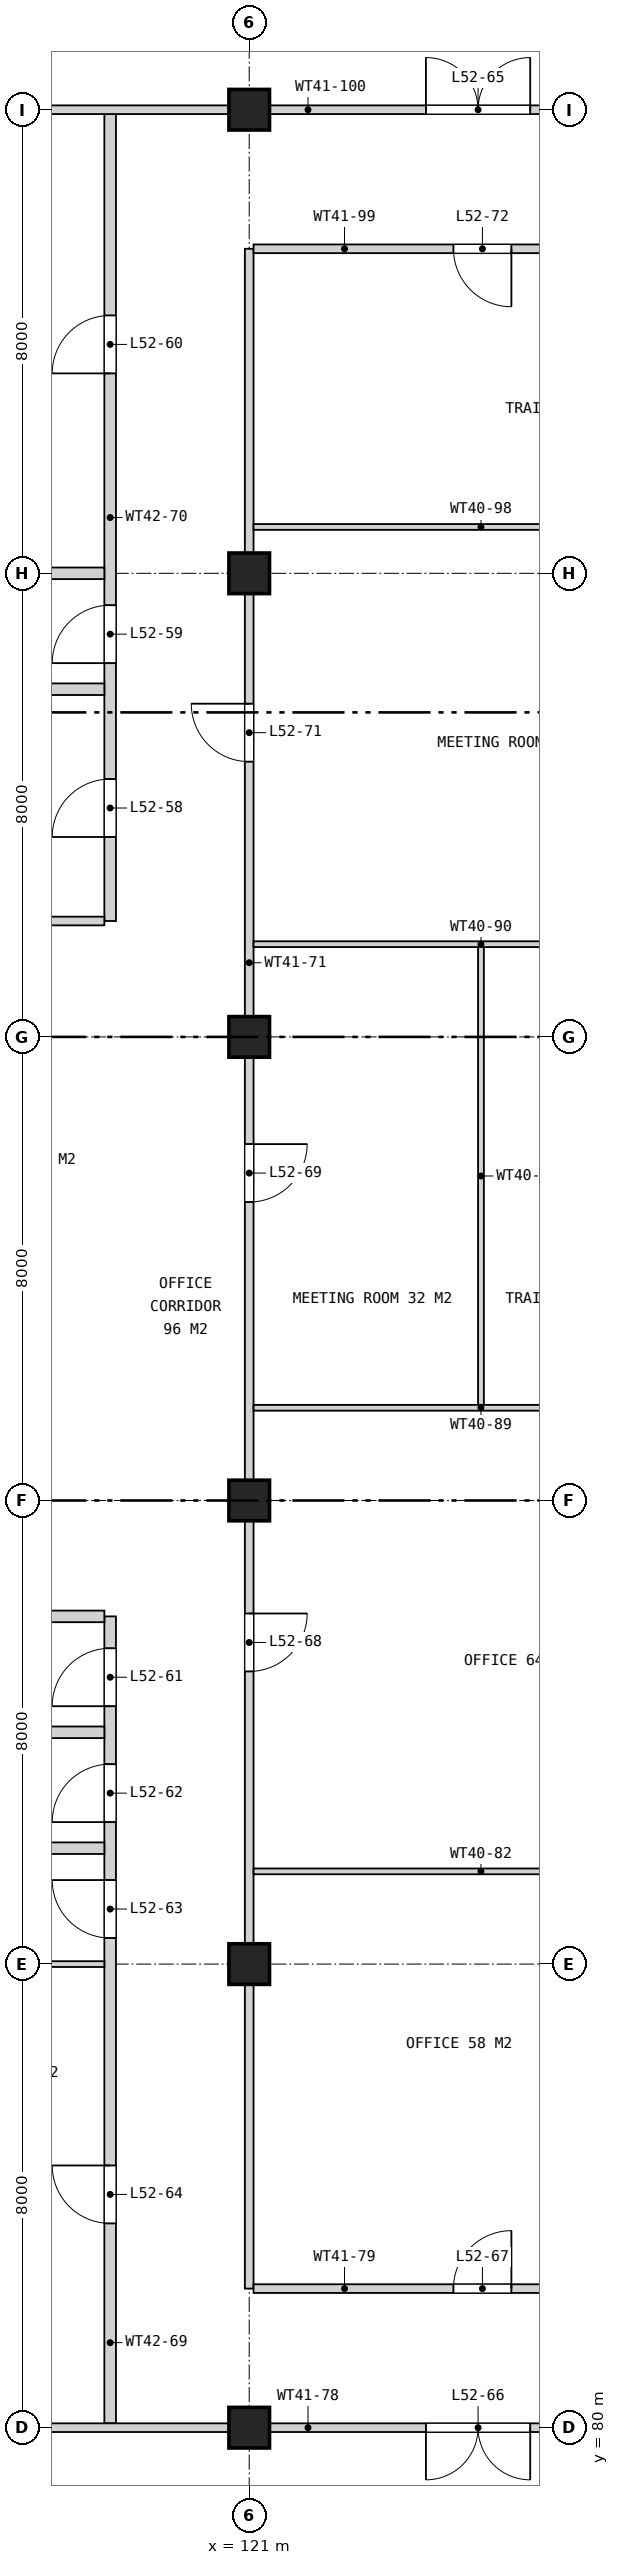
"""IFC4 building model, lengths in metres.
Left out: names, types, materials, properties, quantities, classifications, styles, units other than length and angle.
Written with IfcOpenShell. Run it as: python <this file> out.ifc"""

import sys

from ifc_helpers import new_model, si_unit, direction, frame, frame_2d, origin, origin_2d, place, context, subcontext, project, spatial, rectangle, extrude, element, fill, save


model = new_model("IFC4")
c1 = context("Model", 3, precision=1e-05, world=origin(), true_north=direction((0.0, 1.0)))
c2 = subcontext(c1, "Body", "Model", "MODEL_VIEW")
j1 = project(units=[si_unit("LENGTHUNIT", "METRE"), si_unit("PLANEANGLEUNIT", "RADIAN")], contexts=[c1])
p1 = place(None, origin())
s1 = spatial("IfcSite", under=j1, at=p1, CompositionType="ELEMENT")
p2 = place(p1, origin())
s2 = spatial("IfcBuilding", under=s1, at=p2, CompositionType="ELEMENT")
p3 = place(p2, frame((0.0, 0.0, 245.1)))
s3 = spatial("IfcBuildingStorey", under=s2, at=p3, CompositionType="ELEMENT", Elevation=245.1)
for number, where, z_axis, x_axis in (
    (1, (121.0, 80.0, 0.0), (0.0, 0.0, 1.0), (1.0, 0.0, 0.0)),
    (2, (121.0, 88.0, 0.0), (0.0, 0.0, 1.0), (1.0, 0.0, 0.0)),
    (3, (121.0, 96.0, 0.0), (0.0, 0.0, 1.0), (1.0, 0.0, 0.0)),
    (4, (121.0, 104.0, 0.0), (0.0, 0.0, 1.0), (1.0, 0.0, 0.0)),
    (5, (121.0, 112.0, 0.0), (0.0, 0.0, 1.0), (1.0, 0.0, 0.0)),
    (6, (121.0, 120.0, 0.0), (0.0, 0.0, 1.0), (1.0, 0.0, 0.0)),
):
    element("IfcColumn", number, at=place(p3, frame(where, z_axis=z_axis, x_axis=x_axis)), inside=s3, PredefinedType="COLUMN", context=c2, shape_type="SweptSolid", body=[
        extrude(rectangle(XDim=0.7, YDim=0.7, at=origin_2d()), origin(), (0.0, 0.0, 1.0), 4.2),
    ])
p4 = place(p3, frame((118.6, 80.075, 0.0), z_axis=(0.0, 0.0, 1.0), x_axis=(0.0, 1.0, 0.0)))
e7 = element("IfcWall", 7, at=p4, inside=s3, PredefinedType="SOLIDWALL", context=c2, shape_type="SweptSolid", body=[
    extrude(rectangle(XDim=13.925, YDim=0.2, at=frame_2d((6.962, 0.0))), origin(), (0.0, 0.0, 1.0), 3.443),
])
p5 = place(p4, frame((12.375, 0.0, 0.0)))
e8 = element("IfcOpeningElement", 8, at=p5, cuts=e7, PredefinedType="OPENING", context=c2, shape_type="SweptSolid", body=[
    extrude(rectangle(XDim=1.0, YDim=2.1, at=frame_2d((0.5, 1.05))), frame((0.0, 0.11, 0.0), z_axis=(0.0, -1.0, 0.0), x_axis=(1.0, 0.0, 0.0)), (0.0, 0.0, 1.0), 0.22),
])
p6 = place(p4, frame((10.375, 0.0, 0.0)))
e9 = element("IfcOpeningElement", 9, at=p6, cuts=e7, PredefinedType="OPENING", context=c2, shape_type="SweptSolid", body=[
    extrude(rectangle(XDim=1.0, YDim=2.1, at=frame_2d((0.5, 1.05))), frame((0.0, 0.11, 0.0), z_axis=(0.0, -1.0, 0.0), x_axis=(1.0, 0.0, 0.0)), (0.0, 0.0, 1.0), 0.22),
])
p7 = place(p4, frame((8.375, 0.0, 0.0)))
e10 = element("IfcOpeningElement", 10, at=p7, cuts=e7, PredefinedType="OPENING", context=c2, shape_type="SweptSolid", body=[
    extrude(rectangle(XDim=1.0, YDim=2.1, at=frame_2d((0.5, 1.05))), frame((0.0, 0.11, 0.0), z_axis=(0.0, -1.0, 0.0), x_axis=(1.0, 0.0, 0.0)), (0.0, 0.0, 1.0), 0.22),
])
p8 = place(p4, frame((3.45, 0.0, 0.0)))
e11 = element("IfcOpeningElement", 11, at=p8, cuts=e7, PredefinedType="OPENING", context=c2, shape_type="SweptSolid", body=[
    extrude(rectangle(XDim=1.0, YDim=2.1, at=frame_2d((0.5, 1.05))), frame((0.0, 0.11, 0.0), z_axis=(0.0, -1.0, 0.0), x_axis=(1.0, 0.0, 0.0)), (0.0, 0.0, 1.0), 0.22),
])
p9 = place(p3, frame((118.6, 106.0, 0.0), z_axis=(0.0, 0.0, 1.0), x_axis=(0.0, 1.0, 0.0)))
e12 = element("IfcWall", 12, at=p9, inside=s3, PredefinedType="SOLIDWALL", context=c2, shape_type="SweptSolid", body=[
    extrude(rectangle(XDim=13.925, YDim=0.2, at=frame_2d((6.962, 0.0))), origin(), (0.0, 0.0, 1.0), 3.443),
])
p10 = place(p9, frame((1.45, 0.0, 0.0)))
e13 = element("IfcOpeningElement", 13, at=p10, cuts=e12, PredefinedType="OPENING", context=c2, shape_type="SweptSolid", body=[
    extrude(rectangle(XDim=1.0, YDim=2.1, at=frame_2d((0.5, 1.05))), frame((0.0, 0.11, 0.0), z_axis=(0.0, -1.0, 0.0), x_axis=(1.0, 0.0, 0.0)), (0.0, 0.0, 1.0), 0.22),
])
p11 = place(p9, frame((4.45, 0.0, 0.0)))
e14 = element("IfcOpeningElement", 14, at=p11, cuts=e12, PredefinedType="OPENING", context=c2, shape_type="SweptSolid", body=[
    extrude(rectangle(XDim=1.0, YDim=2.1, at=frame_2d((0.5, 1.05))), frame((0.0, 0.11, 0.0), z_axis=(0.0, -1.0, 0.0), x_axis=(1.0, 0.0, 0.0)), (0.0, 0.0, 1.0), 0.22),
])
p12 = place(p9, frame((9.45, 0.0, 0.0)))
e15 = element("IfcOpeningElement", 15, at=p12, cuts=e12, PredefinedType="OPENING", context=c2, shape_type="SweptSolid", body=[
    extrude(rectangle(XDim=1.0, YDim=2.1, at=frame_2d((0.5, 1.05))), frame((0.0, 0.11, 0.0), z_axis=(0.0, -1.0, 0.0), x_axis=(1.0, 0.0, 0.0)), (0.0, 0.0, 1.0), 0.22),
])
p13 = place(p3, frame((121.0, 82.4, 0.0), z_axis=(0.0, 0.0, 1.0), x_axis=(0.0, 1.0, 0.0)))
e16 = element("IfcWall", 16, at=p13, inside=s3, PredefinedType="PARTITIONING", context=c2, shape_type="SweptSolid", body=[
    extrude(rectangle(XDim=35.2, YDim=0.15, at=frame_2d((17.6, 0.0))), origin(), (0.0, 0.0, 1.0), 3.443),
])
p14 = place(p13, frame((10.65, 0.0, 0.0)))
e17 = element("IfcOpeningElement", 17, at=p14, cuts=e16, PredefinedType="OPENING", context=c2, shape_type="SweptSolid", body=[
    extrude(rectangle(XDim=1.0, YDim=2.1, at=frame_2d((0.5, 1.05))), frame((0.0, 0.085, 0.0), z_axis=(0.0, -1.0, 0.0), x_axis=(1.0, 0.0, 0.0)), (0.0, 0.0, 1.0), 0.17),
])
p15 = place(p13, frame((18.75, 0.0, 0.0)))
e18 = element("IfcOpeningElement", 18, at=p15, cuts=e16, PredefinedType="OPENING", context=c2, shape_type="SweptSolid", body=[
    extrude(rectangle(XDim=1.0, YDim=2.1, at=frame_2d((0.5, 1.05))), frame((0.0, 0.085, 0.0), z_axis=(0.0, -1.0, 0.0), x_axis=(1.0, 0.0, 0.0)), (0.0, 0.0, 1.0), 0.17),
])
p16 = place(p13, frame((26.35, 0.0, 0.0)))
e19 = element("IfcOpeningElement", 19, at=p16, cuts=e16, PredefinedType="OPENING", context=c2, shape_type="SweptSolid", body=[
    extrude(rectangle(XDim=1.0, YDim=2.1, at=frame_2d((0.5, 1.05))), frame((0.0, 0.085, 0.0), z_axis=(0.0, -1.0, 0.0), x_axis=(1.0, 0.0, 0.0)), (0.0, 0.0, 1.0), 0.17),
])
p17 = place(p3, frame((125.0, 97.65, 0.0), z_axis=(0.0, 0.0, 1.0), x_axis=(0.0, 1.0, 0.0)))
e20 = element("IfcWall", 20, at=p17, inside=s3, PredefinedType="PARTITIONING", context=c2, shape_type="SweptSolid", body=[
    extrude(rectangle(XDim=7.9, YDim=0.1, at=frame_2d((3.95, 0.0))), origin(), (0.0, 0.0, 1.0), 3.443),
])
p18 = place(p3, frame((112.73, 80.0, 0.0), z_axis=(0.0, 0.0, 1.0), x_axis=(1.0, 0.0, 0.0)))
e21 = element("IfcWall", 21, at=p18, inside=s3, PredefinedType="PARTITIONING", context=c2, shape_type="SweptSolid", body=[
    extrude(rectangle(XDim=18.57, YDim=0.15, at=frame_2d((9.285, 0.0))), origin(), (0.0, 0.0, 1.0), 3.443),
])
p19 = place(p18, frame((11.32, 0.0, 0.0)))
e22 = element("IfcOpeningElement", 22, at=p19, cuts=e21, PredefinedType="OPENING", context=c2, shape_type="SweptSolid", body=[
    extrude(rectangle(XDim=1.8, YDim=2.1, at=frame_2d((0.9, 1.05))), frame((0.0, 0.085, 0.0), z_axis=(0.0, -1.0, 0.0), x_axis=(1.0, 0.0, 0.0)), (0.0, 0.0, 1.0), 0.17),
])
p20 = place(p3, frame((121.075, 82.4, 0.0), z_axis=(0.0, 0.0, 1.0), x_axis=(1.0, 0.0, 0.0)))
e23 = element("IfcWall", 23, at=p20, inside=s3, PredefinedType="PARTITIONING", context=c2, shape_type="SweptSolid", body=[
    extrude(rectangle(XDim=7.85, YDim=0.15, at=frame_2d((3.925, 0.0))), origin(), (0.0, 0.0, 1.0), 3.443),
])
p21 = place(p20, frame((3.45, 0.0, 0.0)))
e24 = element("IfcOpeningElement", 24, at=p21, cuts=e23, PredefinedType="OPENING", context=c2, shape_type="SweptSolid", body=[
    extrude(rectangle(XDim=1.0, YDim=2.1, at=frame_2d((0.5, 1.05))), frame((0.0, 0.085, 0.0), z_axis=(0.0, -1.0, 0.0), x_axis=(1.0, 0.0, 0.0)), (0.0, 0.0, 1.0), 0.17),
])
p22 = place(p3, frame((113.0, 88.0, 0.0), z_axis=(0.0, 0.0, 1.0), x_axis=(1.0, 0.0, 0.0)))
e25 = element("IfcWall", 25, at=p22, inside=s3, PredefinedType="PARTITIONING", context=c2, shape_type="SweptSolid", body=[
    extrude(rectangle(XDim=5.5, YDim=0.1, at=frame_2d((2.75, 0.0))), origin(), (0.0, 0.0, 1.0), 3.443),
])
p23 = place(p3, frame((121.075, 89.6, 0.0), z_axis=(0.0, 0.0, 1.0), x_axis=(1.0, 0.0, 0.0)))
e26 = element("IfcWall", 26, at=p23, inside=s3, PredefinedType="PARTITIONING", context=c2, shape_type="SweptSolid", body=[
    extrude(rectangle(XDim=7.85, YDim=0.1, at=frame_2d((3.925, 0.0))), origin(), (0.0, 0.0, 1.0), 3.443),
])
for number, where, z_axis, x_axis in (
    (27, (113.0, 90.0, 0.0), (0.0, 0.0, 1.0), (1.0, 0.0, 0.0)),
    (28, (113.0, 92.0, 0.0), (0.0, 0.0, 1.0), (1.0, 0.0, 0.0)),
    (29, (113.0, 94.0, 0.0), (0.0, 0.0, 1.0), (1.0, 0.0, 0.0)),
):
    element("IfcWall", number, at=place(p3, frame(where, z_axis=z_axis, x_axis=x_axis)), inside=s3, PredefinedType="SOLIDWALL", context=c2, shape_type="SweptSolid", body=[
        extrude(rectangle(XDim=5.5, YDim=0.2, at=frame_2d((2.75, 0.0))), origin(), (0.0, 0.0, 1.0), 3.443),
    ])
for number, where, z_axis, x_axis in (
    (30, (121.075, 97.6, 0.0), (0.0, 0.0, 1.0), (1.0, 0.0, 0.0)),
    (31, (121.075, 105.6, 0.0), (0.0, 0.0, 1.0), (1.0, 0.0, 0.0)),
):
    element("IfcWall", number, at=place(p3, frame(where, z_axis=z_axis, x_axis=x_axis)), inside=s3, PredefinedType="PARTITIONING", context=c2, shape_type="SweptSolid", body=[
        extrude(rectangle(XDim=7.85, YDim=0.1, at=frame_2d((3.925, 0.0))), origin(), (0.0, 0.0, 1.0), 3.443),
    ])
p24 = place(p3, frame((113.0, 106.0, 0.0), z_axis=(0.0, 0.0, 1.0), x_axis=(1.0, 0.0, 0.0)))
e32 = element("IfcWall", 32, at=p24, inside=s3, PredefinedType="PARTITIONING", context=c2, shape_type="SweptSolid", body=[
    extrude(rectangle(XDim=5.5, YDim=0.15, at=frame_2d((2.75, 0.0))), origin(), (0.0, 0.0, 1.0), 3.443),
])
for number, where, z_axis, x_axis in (
    (33, (113.0, 110.0, 0.0), (0.0, 0.0, 1.0), (1.0, 0.0, 0.0)),
    (34, (113.0, 112.0, 0.0), (0.0, 0.0, 1.0), (1.0, 0.0, 0.0)),
):
    element("IfcWall", number, at=place(p3, frame(where, z_axis=z_axis, x_axis=x_axis)), inside=s3, PredefinedType="SOLIDWALL", context=c2, shape_type="SweptSolid", body=[
        extrude(rectangle(XDim=5.5, YDim=0.2, at=frame_2d((2.75, 0.0))), origin(), (0.0, 0.0, 1.0), 3.443),
    ])
p25 = place(p3, frame((121.075, 112.8, 0.0), z_axis=(0.0, 0.0, 1.0), x_axis=(1.0, 0.0, 0.0)))
e35 = element("IfcWall", 35, at=p25, inside=s3, PredefinedType="PARTITIONING", context=c2, shape_type="SweptSolid", body=[
    extrude(rectangle(XDim=7.85, YDim=0.1, at=frame_2d((3.925, 0.0))), origin(), (0.0, 0.0, 1.0), 3.443),
])
p26 = place(p3, frame((121.075, 117.6, 0.0), z_axis=(0.0, 0.0, 1.0), x_axis=(1.0, 0.0, 0.0)))
e36 = element("IfcWall", 36, at=p26, inside=s3, PredefinedType="PARTITIONING", context=c2, shape_type="SweptSolid", body=[
    extrude(rectangle(XDim=7.85, YDim=0.15, at=frame_2d((3.925, 0.0))), origin(), (0.0, 0.0, 1.0), 3.443),
])
p27 = place(p26, frame((3.45, 0.0, 0.0)))
e37 = element("IfcOpeningElement", 37, at=p27, cuts=e36, PredefinedType="OPENING", context=c2, shape_type="SweptSolid", body=[
    extrude(rectangle(XDim=1.0, YDim=2.1, at=frame_2d((0.5, 1.05))), frame((0.0, 0.085, 0.0), z_axis=(0.0, -1.0, 0.0), x_axis=(1.0, 0.0, 0.0)), (0.0, 0.0, 1.0), 0.17),
])
p28 = place(p3, frame((112.73, 120.0, 0.0), z_axis=(0.0, 0.0, 1.0), x_axis=(1.0, 0.0, 0.0)))
e38 = element("IfcWall", 38, at=p28, inside=s3, PredefinedType="PARTITIONING", context=c2, shape_type="SweptSolid", body=[
    extrude(rectangle(XDim=18.57, YDim=0.15, at=frame_2d((9.285, 0.0))), origin(), (0.0, 0.0, 1.0), 3.443),
])
p29 = place(p28, frame((11.32, 0.0, 0.0)))
e39 = element("IfcOpeningElement", 39, at=p29, cuts=e38, PredefinedType="OPENING", context=c2, shape_type="SweptSolid", body=[
    extrude(rectangle(XDim=1.8, YDim=2.1, at=frame_2d((0.9, 1.05))), frame((0.0, 0.085, 0.0), z_axis=(0.0, -1.0, 0.0), x_axis=(1.0, 0.0, 0.0)), (0.0, 0.0, 1.0), 0.17),
])
p30 = place(p10, origin())
e40 = element("IfcDoor", 40, at=p30, inside=s3, OperationType="SINGLE_SWING_LEFT", PredefinedType="DOOR", context=c2, shape_type="SweptSolid", body=[
    extrude(rectangle(XDim=1.0, YDim=2.1, at=frame_2d((0.5, 1.05))), frame((0.0, 0.025, 0.0), z_axis=(0.0, -1.0, 0.0), x_axis=(1.0, 0.0, 0.0)), (0.0, 0.0, 1.0), 0.05),
])
fill(e13, e40)
p31 = place(p11, origin())
e41 = element("IfcDoor", 41, at=p31, inside=s3, OperationType="SINGLE_SWING_LEFT", PredefinedType="DOOR", context=c2, shape_type="SweptSolid", body=[
    extrude(rectangle(XDim=1.0, YDim=2.1, at=frame_2d((0.5, 1.05))), frame((0.0, 0.025, 0.0), z_axis=(0.0, -1.0, 0.0), x_axis=(1.0, 0.0, 0.0)), (0.0, 0.0, 1.0), 0.05),
])
fill(e14, e41)
p32 = place(p12, origin())
e42 = element("IfcDoor", 42, at=p32, inside=s3, OperationType="SINGLE_SWING_LEFT", PredefinedType="DOOR", context=c2, shape_type="SweptSolid", body=[
    extrude(rectangle(XDim=1.0, YDim=2.1, at=frame_2d((0.5, 1.05))), frame((0.0, 0.025, 0.0), z_axis=(0.0, -1.0, 0.0), x_axis=(1.0, 0.0, 0.0)), (0.0, 0.0, 1.0), 0.05),
])
fill(e15, e42)
p33 = place(p5, origin())
e43 = element("IfcDoor", 43, at=p33, inside=s3, OperationType="SINGLE_SWING_LEFT", PredefinedType="DOOR", context=c2, shape_type="SweptSolid", body=[
    extrude(rectangle(XDim=1.0, YDim=2.1, at=frame_2d((0.5, 1.05))), frame((0.0, 0.025, 0.0), z_axis=(0.0, -1.0, 0.0), x_axis=(1.0, 0.0, 0.0)), (0.0, 0.0, 1.0), 0.05),
])
fill(e8, e43)
p34 = place(p6, origin())
e44 = element("IfcDoor", 44, at=p34, inside=s3, OperationType="SINGLE_SWING_LEFT", PredefinedType="DOOR", context=c2, shape_type="SweptSolid", body=[
    extrude(rectangle(XDim=1.0, YDim=2.1, at=frame_2d((0.5, 1.05))), frame((0.0, 0.025, 0.0), z_axis=(0.0, -1.0, 0.0), x_axis=(1.0, 0.0, 0.0)), (0.0, 0.0, 1.0), 0.05),
])
fill(e9, e44)
p35 = place(p7, origin())
e45 = element("IfcDoor", 45, at=p35, inside=s3, OperationType="SINGLE_SWING_RIGHT", PredefinedType="DOOR", context=c2, shape_type="SweptSolid", body=[
    extrude(rectangle(XDim=1.0, YDim=2.1, at=frame_2d((0.5, 1.05))), frame((0.0, 0.025, 0.0), z_axis=(0.0, -1.0, 0.0), x_axis=(1.0, 0.0, 0.0)), (0.0, 0.0, 1.0), 0.05),
])
fill(e10, e45)
p36 = place(p8, origin())
e46 = element("IfcDoor", 46, at=p36, inside=s3, OperationType="SINGLE_SWING_RIGHT", PredefinedType="DOOR", context=c2, shape_type="SweptSolid", body=[
    extrude(rectangle(XDim=1.0, YDim=2.1, at=frame_2d((0.5, 1.05))), frame((0.0, 0.025, 0.0), z_axis=(0.0, -1.0, 0.0), x_axis=(1.0, 0.0, 0.0)), (0.0, 0.0, 1.0), 0.05),
])
fill(e11, e46)
p37 = place(p29, origin())
e47 = element("IfcDoor", 47, at=p37, inside=s3, OperationType="DOUBLE_DOOR_SINGLE_SWING", PredefinedType="DOOR", context=c2, shape_type="SweptSolid", body=[
    extrude(rectangle(XDim=1.8, YDim=2.1, at=frame_2d((0.9, 1.05))), frame((0.0, 0.025, 0.0), z_axis=(0.0, -1.0, 0.0), x_axis=(1.0, 0.0, 0.0)), (0.0, 0.0, 1.0), 0.05),
])
fill(e39, e47)
p38 = place(p19, frame((1.8, 0.0, 0.0), z_axis=(0.0, 0.0, 1.0), x_axis=(-1.0, 0.0, 0.0)))
e48 = element("IfcDoor", 48, at=p38, inside=s3, OperationType="DOUBLE_DOOR_SINGLE_SWING", PredefinedType="DOOR", context=c2, shape_type="SweptSolid", body=[
    extrude(rectangle(XDim=1.8, YDim=2.1, at=frame_2d((0.9, 1.05))), frame((0.0, 0.025, 0.0), z_axis=(0.0, -1.0, 0.0), x_axis=(1.0, 0.0, 0.0)), (0.0, 0.0, 1.0), 0.05),
])
fill(e22, e48)
p39 = place(p21, origin())
e49 = element("IfcDoor", 49, at=p39, inside=s3, OperationType="SINGLE_SWING_RIGHT", PredefinedType="DOOR", context=c2, shape_type="SweptSolid", body=[
    extrude(rectangle(XDim=1.0, YDim=2.1, at=frame_2d((0.5, 1.05))), frame((0.0, 0.025, 0.0), z_axis=(0.0, -1.0, 0.0), x_axis=(1.0, 0.0, 0.0)), (0.0, 0.0, 1.0), 0.05),
])
fill(e24, e49)
p40 = place(p14, frame((1.0, 0.0, 0.0), z_axis=(0.0, 0.0, 1.0), x_axis=(-1.0, 0.0, 0.0)))
e50 = element("IfcDoor", 50, at=p40, inside=s3, OperationType="SINGLE_SWING_LEFT", PredefinedType="DOOR", context=c2, shape_type="SweptSolid", body=[
    extrude(rectangle(XDim=1.0, YDim=2.1, at=frame_2d((0.5, 1.05))), frame((0.0, 0.025, 0.0), z_axis=(0.0, -1.0, 0.0), x_axis=(1.0, 0.0, 0.0)), (0.0, 0.0, 1.0), 0.05),
])
fill(e17, e50)
p41 = place(p15, frame((1.0, 0.0, 0.0), z_axis=(0.0, 0.0, 1.0), x_axis=(-1.0, 0.0, 0.0)))
e51 = element("IfcDoor", 51, at=p41, inside=s3, OperationType="SINGLE_SWING_LEFT", PredefinedType="DOOR", context=c2, shape_type="SweptSolid", body=[
    extrude(rectangle(XDim=1.0, YDim=2.1, at=frame_2d((0.5, 1.05))), frame((0.0, 0.025, 0.0), z_axis=(0.0, -1.0, 0.0), x_axis=(1.0, 0.0, 0.0)), (0.0, 0.0, 1.0), 0.05),
])
fill(e18, e51)
p42 = place(p16, origin())
e52 = element("IfcDoor", 52, at=p42, inside=s3, OperationType="SINGLE_SWING_RIGHT", PredefinedType="DOOR", context=c2, shape_type="SweptSolid", body=[
    extrude(rectangle(XDim=1.0, YDim=2.1, at=frame_2d((0.5, 1.05))), frame((0.0, 0.025, 0.0), z_axis=(0.0, -1.0, 0.0), x_axis=(1.0, 0.0, 0.0)), (0.0, 0.0, 1.0), 0.05),
])
fill(e19, e52)
p43 = place(p27, frame((1.0, 0.0, 0.0), z_axis=(0.0, 0.0, 1.0), x_axis=(-1.0, 0.0, 0.0)))
e53 = element("IfcDoor", 53, at=p43, inside=s3, OperationType="SINGLE_SWING_LEFT", PredefinedType="DOOR", context=c2, shape_type="SweptSolid", body=[
    extrude(rectangle(XDim=1.0, YDim=2.1, at=frame_2d((0.5, 1.05))), frame((0.0, 0.025, 0.0), z_axis=(0.0, -1.0, 0.0), x_axis=(1.0, 0.0, 0.0)), (0.0, 0.0, 1.0), 0.05),
])
fill(e37, e53)
save(model, sys.argv[1])
